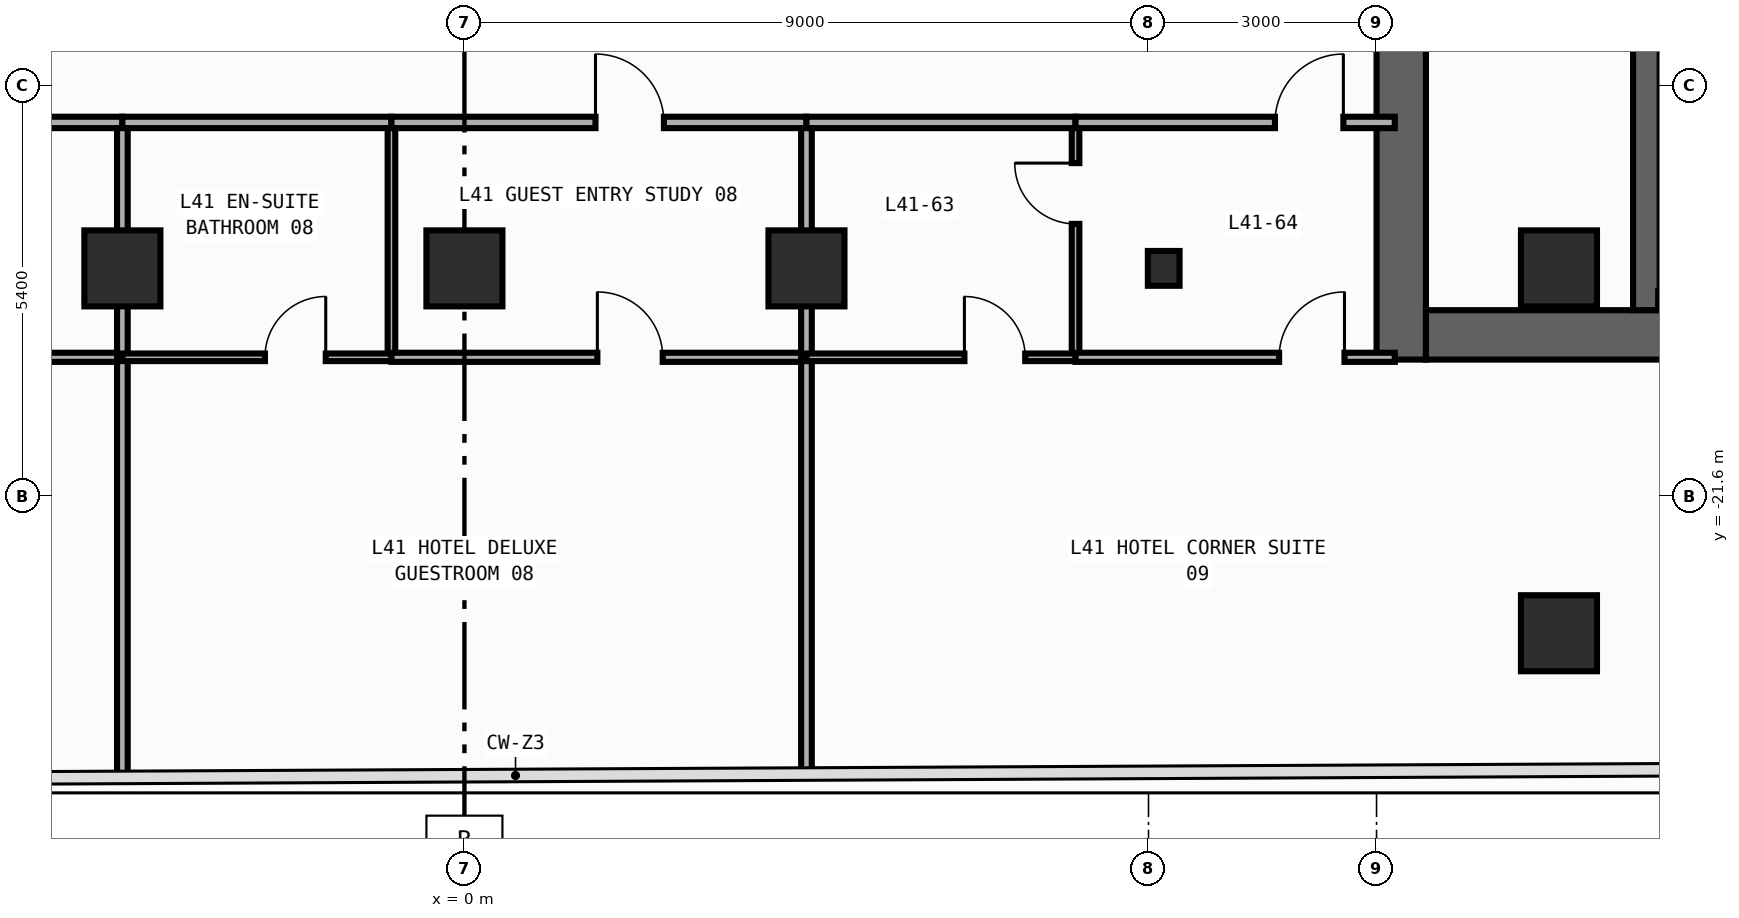
"""IFC4 building model, lengths in metres.
Left out: names, types, materials, properties, quantities, classifications, styles, units other than length and angle.
Written with IfcOpenShell. Run it as: python <this file> out.ifc"""

import sys

from ifc_helpers import new_model, si_unit, direction, frame, frame_2d, origin, origin_2d, place, context, subcontext, project, spatial, rectangle, i_section, extrude, element, fill, save


model = new_model("IFC4")
c1 = context("Model", 3, precision=1e-05, world=origin(), true_north=direction((0.0, 1.0)))
c2 = subcontext(c1, "Body", "Model", "MODEL_VIEW")
j1 = project(units=[si_unit("LENGTHUNIT", "METRE"), si_unit("PLANEANGLEUNIT", "RADIAN")], contexts=[c1])
p1 = place(None, origin())
s1 = spatial("IfcSite", under=j1, at=p1, CompositionType="ELEMENT")
p2 = place(p1, origin())
s2 = spatial("IfcBuilding", under=s1, at=p2, CompositionType="ELEMENT")
p3 = place(p2, frame((0.0, 0.0, 180.2)))
s3 = spatial("IfcBuildingStorey", under=s2, at=p3, CompositionType="ELEMENT", Elevation=180.2)
p4 = place(p3, frame((12.325, -19.8, 0.0), z_axis=(0.0, 0.0, 1.0), x_axis=(0.0, 1.0, 0.0)))
e1 = element("IfcWall", 1, at=p4, inside=s3, PredefinedType="SHEAR", context=c2, shape_type="SweptSolid", body=[
    extrude(rectangle(XDim=27.0, YDim=0.65, at=frame_2d((13.5, 0.0))), origin(), (0.0, 0.0, 1.0), 3.54),
])
p5 = place(p4, frame((23.05, 0.0, 0.0)))
e2 = element("IfcOpeningElement", 2, at=p5, cuts=e1, PredefinedType="OPENING", context=c2, shape_type="SweptSolid", body=[
    extrude(rectangle(XDim=1.1, YDim=2.2, at=frame_2d((0.55, 1.1))), frame((0.0, 0.335, 0.0), z_axis=(0.0, -1.0, 0.0), x_axis=(1.0, 0.0, 0.0)), (0.0, 0.0, 1.0), 0.67),
])
p6 = place(p4, frame((19.85, 0.0, 0.0)))
e3 = element("IfcOpeningElement", 3, at=p6, cuts=e1, PredefinedType="OPENING", context=c2, shape_type="SweptSolid", body=[
    extrude(rectangle(XDim=1.1, YDim=2.2, at=frame_2d((0.55, 1.1))), frame((0.0, 0.335, 0.0), z_axis=(0.0, -1.0, 0.0), x_axis=(1.0, 0.0, 0.0)), (0.0, 0.0, 1.0), 0.67),
])
p7 = place(p4, frame((16.65, 0.0, 0.0)))
e4 = element("IfcOpeningElement", 4, at=p7, cuts=e1, PredefinedType="OPENING", context=c2, shape_type="SweptSolid", body=[
    extrude(rectangle(XDim=1.1, YDim=2.2, at=frame_2d((0.55, 1.1))), frame((0.0, 0.335, 0.0), z_axis=(0.0, -1.0, 0.0), x_axis=(1.0, 0.0, 0.0)), (0.0, 0.0, 1.0), 0.67),
])
p8 = place(p4, frame((10.175, 0.0, 0.0)))
e5 = element("IfcOpeningElement", 5, at=p8, cuts=e1, PredefinedType="OPENING", context=c2, shape_type="SweptSolid", body=[
    extrude(rectangle(XDim=0.85, YDim=2.1, at=frame_2d((0.425, 1.05))), frame((0.0, 0.335, 0.0), z_axis=(0.0, -1.0, 0.0), x_axis=(1.0, 0.0, 0.0)), (0.0, 0.0, 1.0), 0.67),
])
p9 = place(p4, frame((12.725, 0.0, 0.0)))
e6 = element("IfcOpeningElement", 6, at=p9, cuts=e1, PredefinedType="OPENING", context=c2, shape_type="SweptSolid", body=[
    extrude(rectangle(XDim=1.15, YDim=2.2, at=frame_2d((0.575, 1.1))), frame((0.0, 0.335, 0.0), z_axis=(0.0, -1.0, 0.0), x_axis=(1.0, 0.0, 0.0)), (0.0, 0.0, 1.0), 0.67),
])
p10 = place(p4, frame((25.125, 0.0, 0.0)))
e7 = element("IfcOpeningElement", 7, at=p10, cuts=e1, PredefinedType="OPENING", context=c2, shape_type="SweptSolid", body=[
    extrude(rectangle(XDim=0.85, YDim=2.1, at=frame_2d((0.425, 1.05))), frame((0.0, 0.335, 0.0), z_axis=(0.0, -1.0, 0.0), x_axis=(1.0, 0.0, 0.0)), (0.0, 0.0, 1.0), 0.67),
])
p11 = place(p3, frame((12.65, -19.475, 0.0), z_axis=(0.0, 0.0, 1.0), x_axis=(1.0, 0.0, 0.0)))
e8 = element("IfcWall", 8, at=p11, inside=s3, PredefinedType="SHEAR", context=c2, shape_type="SweptSolid", body=[
    extrude(rectangle(XDim=7.1, YDim=0.65, at=frame_2d((3.55, 0.0))), origin(), (0.0, 0.0, 1.0), 3.54),
])
p12 = place(p3, frame((15.55, -19.15, 0.0), z_axis=(0.0, 0.0, 1.0), x_axis=(0.0, 1.0, 0.0)))
e9 = element("IfcWall", 9, at=p12, inside=s3, PredefinedType="SHEAR", context=c2, shape_type="SweptSolid", body=[
    extrude(rectangle(XDim=25.7, YDim=0.35, at=frame_2d((12.85, 0.0))), origin(), (0.0, 0.0, 1.0), 3.54),
])
p13 = place(p12, frame((12.075, 0.0, 0.0)))
e10 = element("IfcOpeningElement", 10, at=p13, cuts=e9, PredefinedType="OPENING", context=c2, shape_type="SweptSolid", body=[
    extrude(rectangle(XDim=1.15, YDim=2.2, at=frame_2d((0.575, 1.1))), frame((0.0, 0.185, 0.0), z_axis=(0.0, -1.0, 0.0), x_axis=(1.0, 0.0, 0.0)), (0.0, 0.0, 1.0), 0.37),
])
p14 = place(p12, frame((24.475, 0.0, 0.0)))
e11 = element("IfcOpeningElement", 11, at=p14, cuts=e9, PredefinedType="OPENING", context=c2, shape_type="SweptSolid", body=[
    extrude(rectangle(XDim=0.85, YDim=2.1, at=frame_2d((0.425, 1.05))), frame((0.0, 0.185, 0.0), z_axis=(0.0, -1.0, 0.0), x_axis=(1.0, 0.0, 0.0)), (0.0, 0.0, 1.0), 0.37),
])
p15 = place(p3, frame((15.705, -19.01, 0.0), z_axis=(0.0, 0.0, 1.0), x_axis=(1.0, 0.0, 0.0)))
e12 = element("IfcWall", 12, at=p15, inside=s3, PredefinedType="SHEAR", context=c2, shape_type="SweptSolid", body=[
    extrude(rectangle(XDim=4.065, YDim=0.22, at=frame_2d((2.032, 0.0))), origin(), (0.0, 0.0, 1.0), 3.54),
])
p16 = place(p3, frame((9.2, -18.6, 0.0), z_axis=(0.0, 0.0, 1.0), x_axis=(1.0, 0.0, 0.0)))
e13 = element("IfcColumn", 13, at=p16, inside=s3, PredefinedType="COLUMN", context=c2, shape_type="SweptSolid", body=[
    extrude(i_section(OverallWidth=0.417, OverallDepth=0.458, WebThickness=0.03, FlangeThickness=0.05, FilletRadius=0.022, at=origin_2d()), origin(), (0.0, 0.0, 1.0), 3.8),
])
for number, where, z_axis, x_axis in (
    (14, (14.4, -18.6, 0.0), (0.0, 0.0, 1.0), (1.0, 0.0, 0.0)),
    (15, (-4.5, -18.6, 0.0), (0.0, 0.0, 1.0), (1.0, 0.0, 0.0)),
    (16, (0.0, -18.6, 0.0), (0.0, 0.0, 1.0), (1.0, 0.0, 0.0)),
    (17, (4.5, -18.6, 0.0), (0.0, 0.0, 1.0), (1.0, 0.0, 0.0)),
    (18, (14.4, -23.4, 0.0), (0.0, 0.0, 1.0), (1.0, 0.0, 0.0)),
):
    element("IfcColumn", number, at=place(p3, frame(where, z_axis=z_axis, x_axis=x_axis)), inside=s3, PredefinedType="COLUMN", context=c2, shape_type="SweptSolid", body=[
        extrude(rectangle(XDim=1.0, YDim=1.0, at=origin_2d()), origin(), (0.0, 0.0, 1.0), 3.8),
    ])
p17 = place(p3, frame((-10.86, -16.68, 0.0), z_axis=(0.0, 0.0, 1.0), x_axis=(1.0, 0.0, 0.0)))
e19 = element("IfcWall", 19, at=p17, inside=s3, PredefinedType="PARTITIONING", context=c2, shape_type="SweptSolid", body=[
    extrude(rectangle(XDim=6.36, YDim=0.15, at=frame_2d((3.18, 0.0))), origin(), (0.0, 0.0, 1.0), 3.54),
])
p18 = place(p17, frame((3.349, 0.0, 0.0)))
e20 = element("IfcOpeningElement", 20, at=p18, cuts=e19, PredefinedType="OPENING", context=c2, shape_type="SweptSolid", body=[
    extrude(rectangle(XDim=0.9, YDim=2.15, at=frame_2d((0.45, 1.075))), frame((0.0, 0.085, 0.0), z_axis=(0.0, -1.0, 0.0), x_axis=(1.0, 0.0, 0.0)), (0.0, 0.0, 1.0), 0.17),
])
p19 = place(p3, frame((-4.5, -16.68, 0.0), z_axis=(0.0, 0.0, 1.0), x_axis=(1.0, 0.0, 0.0)))
e21 = element("IfcWall", 21, at=p19, inside=s3, PredefinedType="PARTITIONING", context=c2, shape_type="SweptSolid", body=[
    extrude(rectangle(XDim=3.54, YDim=0.15, at=frame_2d((1.77, 0.0))), origin(), (0.0, 0.0, 1.0), 3.54),
])
p20 = place(p3, frame((-0.96, -16.68, 0.0), z_axis=(0.0, 0.0, 1.0), x_axis=(1.0, 0.0, 0.0)))
e22 = element("IfcWall", 22, at=p20, inside=s3, PredefinedType="PARTITIONING", context=c2, shape_type="SweptSolid", body=[
    extrude(rectangle(XDim=5.46, YDim=0.15, at=frame_2d((2.73, 0.0))), origin(), (0.0, 0.0, 1.0), 3.54),
])
p21 = place(p20, frame((2.684, 0.0, 0.0)))
e23 = element("IfcOpeningElement", 23, at=p21, cuts=e22, PredefinedType="OPENING", context=c2, shape_type="SweptSolid", body=[
    extrude(rectangle(XDim=0.9, YDim=2.15, at=frame_2d((0.45, 1.075))), frame((0.0, 0.085, 0.0), z_axis=(0.0, -1.0, 0.0), x_axis=(1.0, 0.0, 0.0)), (0.0, 0.0, 1.0), 0.17),
])
p22 = place(p3, frame((4.5, -16.68, 0.0), z_axis=(0.0, 0.0, 1.0), x_axis=(1.0, 0.0, 0.0)))
e24 = element("IfcWall", 24, at=p22, inside=s3, PredefinedType="PARTITIONING", context=c2, shape_type="SweptSolid", body=[
    extrude(rectangle(XDim=3.54, YDim=0.15, at=frame_2d((1.77, 0.0))), origin(), (0.0, 0.0, 1.0), 3.54),
])
p23 = place(p3, frame((8.04, -16.68, 0.0), z_axis=(0.0, 0.0, 1.0), x_axis=(1.0, 0.0, 0.0)))
e25 = element("IfcWall", 25, at=p23, inside=s3, PredefinedType="PARTITIONING", context=c2, shape_type="SweptSolid", body=[
    extrude(rectangle(XDim=4.2, YDim=0.15, at=frame_2d((2.1, 0.0))), origin(), (0.0, 0.0, 1.0), 3.54),
])
p24 = place(p23, frame((2.624, 0.0, 0.0)))
e26 = element("IfcOpeningElement", 26, at=p24, cuts=e25, PredefinedType="OPENING", context=c2, shape_type="SweptSolid", body=[
    extrude(rectangle(XDim=0.9, YDim=2.15, at=frame_2d((0.45, 1.075))), frame((0.0, 0.085, 0.0), z_axis=(0.0, -1.0, 0.0), x_axis=(1.0, 0.0, 0.0)), (0.0, 0.0, 1.0), 0.17),
])
p25 = place(p3, frame((-10.86, -19.77, 0.0), z_axis=(0.0, 0.0, 1.0), x_axis=(1.0, 0.0, 0.0)))
e27 = element("IfcWall", 27, at=p25, inside=s3, PredefinedType="PARTITIONING", context=c2, shape_type="SweptSolid", body=[
    extrude(rectangle(XDim=6.36, YDim=0.12, at=frame_2d((3.18, 0.0))), origin(), (0.0, 0.0, 1.0), 3.54),
])
p26 = place(p25, frame((3.375, 0.0, 0.0)))
e28 = element("IfcOpeningElement", 28, at=p26, cuts=e27, PredefinedType="OPENING", context=c2, shape_type="SweptSolid", body=[
    extrude(rectangle(XDim=0.86, YDim=2.15, at=frame_2d((0.43, 1.075))), frame((0.0, 0.07, 0.0), z_axis=(0.0, -1.0, 0.0), x_axis=(1.0, 0.0, 0.0)), (0.0, 0.0, 1.0), 0.14),
])
p27 = place(p3, frame((-4.5, -19.77, 0.0), z_axis=(0.0, 0.0, 1.0), x_axis=(0.0, 1.0, 0.0)))
e29 = element("IfcWall", 29, at=p27, inside=s3, PredefinedType="PARTITIONING", context=c2, shape_type="SweptSolid", body=[
    extrude(rectangle(XDim=3.015, YDim=0.14, at=frame_2d((1.508, 0.0))), origin(), (0.0, 0.0, 1.0), 3.54),
])
p28 = place(p3, frame((-4.5, -25.292, 0.0), z_axis=(0.0, 0.0, 1.0), x_axis=(0.0, 1.0, 0.0)))
e30 = element("IfcWall", 30, at=p28, inside=s3, PredefinedType="PARTITIONING", context=c2, shape_type="SweptSolid", body=[
    extrude(rectangle(XDim=5.522, YDim=0.14, at=frame_2d((2.761, 0.0))), origin(), (0.0, 0.0, 1.0), 3.54),
])
p29 = place(p3, frame((-0.96, -19.72, 0.0), z_axis=(0.0, 0.0, 1.0), x_axis=(0.0, 1.0, 0.0)))
e31 = element("IfcWall", 31, at=p29, inside=s3, PredefinedType="PARTITIONING", context=c2, shape_type="SweptSolid", body=[
    extrude(rectangle(XDim=2.965, YDim=0.1, at=frame_2d((1.482, 0.0))), origin(), (0.0, 0.0, 1.0), 3.54),
])
p30 = place(p3, frame((-4.5, -19.77, 0.0), z_axis=(0.0, 0.0, 1.0), x_axis=(1.0, 0.0, 0.0)))
e32 = element("IfcWall", 32, at=p30, inside=s3, PredefinedType="PARTITIONING", context=c2, shape_type="SweptSolid", body=[
    extrude(rectangle(XDim=3.54, YDim=0.1, at=frame_2d((1.77, 0.0))), origin(), (0.0, 0.0, 1.0), 3.54),
])
p31 = place(p30, frame((1.875, 0.0, 0.0)))
e33 = element("IfcOpeningElement", 33, at=p31, cuts=e32, PredefinedType="OPENING", context=c2, shape_type="SweptSolid", body=[
    extrude(rectangle(XDim=0.8, YDim=2.1, at=frame_2d((0.4, 1.05))), frame((0.0, 0.06, 0.0), z_axis=(0.0, -1.0, 0.0), x_axis=(1.0, 0.0, 0.0)), (0.0, 0.0, 1.0), 0.12),
])
p32 = place(p3, frame((-0.96, -19.77, 0.0), z_axis=(0.0, 0.0, 1.0), x_axis=(1.0, 0.0, 0.0)))
e34 = element("IfcWall", 34, at=p32, inside=s3, PredefinedType="PARTITIONING", context=c2, shape_type="SweptSolid", body=[
    extrude(rectangle(XDim=5.46, YDim=0.12, at=frame_2d((2.73, 0.0))), origin(), (0.0, 0.0, 1.0), 3.54),
])
p33 = place(p32, frame((2.709, 0.0, 0.0)))
e35 = element("IfcOpeningElement", 35, at=p33, cuts=e34, PredefinedType="OPENING", context=c2, shape_type="SweptSolid", body=[
    extrude(rectangle(XDim=0.86, YDim=2.15, at=frame_2d((0.43, 1.075))), frame((0.0, 0.07, 0.0), z_axis=(0.0, -1.0, 0.0), x_axis=(1.0, 0.0, 0.0)), (0.0, 0.0, 1.0), 0.14),
])
p34 = place(p3, frame((4.5, -19.77, 0.0), z_axis=(0.0, 0.0, 1.0), x_axis=(0.0, 1.0, 0.0)))
e36 = element("IfcWall", 36, at=p34, inside=s3, PredefinedType="PARTITIONING", context=c2, shape_type="SweptSolid", body=[
    extrude(rectangle(XDim=3.015, YDim=0.14, at=frame_2d((1.508, 0.0))), origin(), (0.0, 0.0, 1.0), 3.54),
])
p35 = place(p3, frame((4.5, -25.248, 0.0), z_axis=(0.0, 0.0, 1.0), x_axis=(0.0, 1.0, 0.0)))
e37 = element("IfcWall", 37, at=p35, inside=s3, PredefinedType="PARTITIONING", context=c2, shape_type="SweptSolid", body=[
    extrude(rectangle(XDim=5.478, YDim=0.14, at=frame_2d((2.739, 0.0))), origin(), (0.0, 0.0, 1.0), 3.54),
])
p36 = place(p3, frame((8.04, -19.72, 0.0), z_axis=(0.0, 0.0, 1.0), x_axis=(0.0, 1.0, 0.0)))
e38 = element("IfcWall", 38, at=p36, inside=s3, PredefinedType="PARTITIONING", context=c2, shape_type="SweptSolid", body=[
    extrude(rectangle(XDim=2.965, YDim=0.1, at=frame_2d((1.482, 0.0))), origin(), (0.0, 0.0, 1.0), 3.54),
])
p37 = place(p36, frame((1.705, 0.0, 0.0)))
e39 = element("IfcOpeningElement", 39, at=p37, cuts=e38, PredefinedType="OPENING", context=c2, shape_type="SweptSolid", body=[
    extrude(rectangle(XDim=0.8, YDim=2.1, at=frame_2d((0.4, 1.05))), frame((0.0, 0.06, 0.0), z_axis=(0.0, -1.0, 0.0), x_axis=(1.0, 0.0, 0.0)), (0.0, 0.0, 1.0), 0.12),
])
p38 = place(p3, frame((4.5, -19.77, 0.0), z_axis=(0.0, 0.0, 1.0), x_axis=(1.0, 0.0, 0.0)))
e40 = element("IfcWall", 40, at=p38, inside=s3, PredefinedType="PARTITIONING", context=c2, shape_type="SweptSolid", body=[
    extrude(rectangle(XDim=3.54, YDim=0.1, at=frame_2d((1.77, 0.0))), origin(), (0.0, 0.0, 1.0), 3.54),
])
p39 = place(p38, frame((2.078, 0.0, 0.0)))
e41 = element("IfcOpeningElement", 41, at=p39, cuts=e40, PredefinedType="OPENING", context=c2, shape_type="SweptSolid", body=[
    extrude(rectangle(XDim=0.8, YDim=2.1, at=frame_2d((0.4, 1.05))), frame((0.0, 0.06, 0.0), z_axis=(0.0, -1.0, 0.0), x_axis=(1.0, 0.0, 0.0)), (0.0, 0.0, 1.0), 0.12),
])
p40 = place(p3, frame((8.04, -19.77, 0.0), z_axis=(0.0, 0.0, 1.0), x_axis=(1.0, 0.0, 0.0)))
e42 = element("IfcWall", 42, at=p40, inside=s3, PredefinedType="PARTITIONING", context=c2, shape_type="SweptSolid", body=[
    extrude(rectangle(XDim=4.2, YDim=0.12, at=frame_2d((2.1, 0.0))), origin(), (0.0, 0.0, 1.0), 3.54),
])
p41 = place(p40, frame((2.678, 0.0, 0.0)))
e43 = element("IfcOpeningElement", 43, at=p41, cuts=e42, PredefinedType="OPENING", context=c2, shape_type="SweptSolid", body=[
    extrude(rectangle(XDim=0.86, YDim=2.15, at=frame_2d((0.43, 1.075))), frame((0.0, 0.07, 0.0), z_axis=(0.0, -1.0, 0.0), x_axis=(1.0, 0.0, 0.0)), (0.0, 0.0, 1.0), 0.14),
])
p42 = place(p21, origin())
e44 = element("IfcDoor", 44, at=p42, inside=s3, OperationType="SINGLE_SWING_LEFT", PredefinedType="DOOR", context=c2, shape_type="SweptSolid", body=[
    extrude(rectangle(XDim=0.9, YDim=2.15, at=frame_2d((0.45, 1.075))), frame((0.0, 0.025, 0.0), z_axis=(0.0, -1.0, 0.0), x_axis=(1.0, 0.0, 0.0)), (0.0, 0.0, 1.0), 0.05),
])
fill(e23, e44)
p43 = place(p24, origin())
e45 = element("IfcDoor", 45, at=p43, inside=s3, OperationType="SINGLE_SWING_RIGHT", PredefinedType="DOOR", context=c2, shape_type="SweptSolid", body=[
    extrude(rectangle(XDim=0.9, YDim=2.15, at=frame_2d((0.45, 1.075))), frame((0.0, 0.025, 0.0), z_axis=(0.0, -1.0, 0.0), x_axis=(1.0, 0.0, 0.0)), (0.0, 0.0, 1.0), 0.05),
])
fill(e26, e45)
p44 = place(p31, origin())
e46 = element("IfcDoor", 46, at=p44, inside=s3, OperationType="SINGLE_SWING_RIGHT", PredefinedType="DOOR", context=c2, shape_type="SweptSolid", body=[
    extrude(rectangle(XDim=0.8, YDim=2.1, at=frame_2d((0.4, 1.05))), frame((0.0, 0.025, 0.0), z_axis=(0.0, -1.0, 0.0), x_axis=(1.0, 0.0, 0.0)), (0.0, 0.0, 1.0), 0.05),
])
fill(e33, e46)
p45 = place(p33, origin())
e47 = element("IfcDoor", 47, at=p45, inside=s3, OperationType="SINGLE_SWING_LEFT", PredefinedType="DOOR", context=c2, shape_type="SweptSolid", body=[
    extrude(rectangle(XDim=0.86, YDim=2.15, at=frame_2d((0.43, 1.075))), frame((0.0, 0.025, 0.0), z_axis=(0.0, -1.0, 0.0), x_axis=(1.0, 0.0, 0.0)), (0.0, 0.0, 1.0), 0.05),
])
fill(e35, e47)
p46 = place(p37, origin())
e48 = element("IfcDoor", 48, at=p46, inside=s3, OperationType="SINGLE_SWING_RIGHT", PredefinedType="DOOR", context=c2, shape_type="SweptSolid", body=[
    extrude(rectangle(XDim=0.8, YDim=2.1, at=frame_2d((0.4, 1.05))), frame((0.0, 0.025, 0.0), z_axis=(0.0, -1.0, 0.0), x_axis=(1.0, 0.0, 0.0)), (0.0, 0.0, 1.0), 0.05),
])
fill(e39, e48)
p47 = place(p39, origin())
e49 = element("IfcDoor", 49, at=p47, inside=s3, OperationType="SINGLE_SWING_LEFT", PredefinedType="DOOR", context=c2, shape_type="SweptSolid", body=[
    extrude(rectangle(XDim=0.8, YDim=2.1, at=frame_2d((0.4, 1.05))), frame((0.0, 0.025, 0.0), z_axis=(0.0, -1.0, 0.0), x_axis=(1.0, 0.0, 0.0)), (0.0, 0.0, 1.0), 0.05),
])
fill(e41, e49)
p48 = place(p41, origin())
e50 = element("IfcDoor", 50, at=p48, inside=s3, OperationType="SINGLE_SWING_RIGHT", PredefinedType="DOOR", context=c2, shape_type="SweptSolid", body=[
    extrude(rectangle(XDim=0.86, YDim=2.15, at=frame_2d((0.43, 1.075))), frame((0.0, 0.025, 0.0), z_axis=(0.0, -1.0, 0.0), x_axis=(1.0, 0.0, 0.0)), (0.0, 0.0, 1.0), 0.05),
])
fill(e43, e50)
save(model, sys.argv[1])
